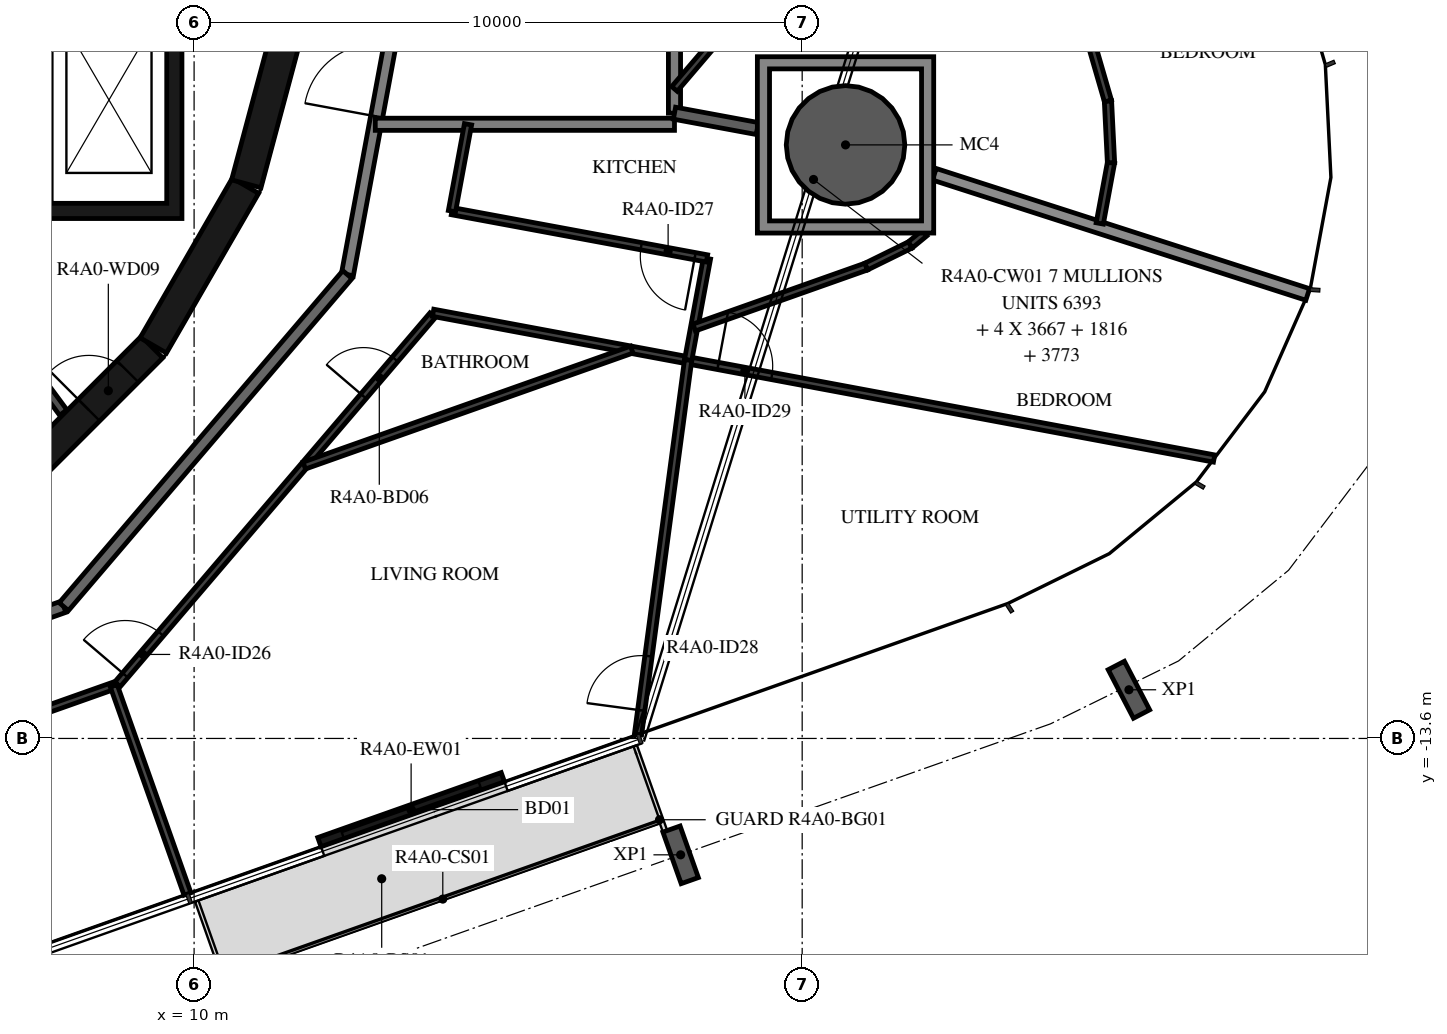
"""IFC4 building model, lengths in metres.
Left out: names, types, materials, properties, quantities, classifications, styles, units other than length and angle.
Written with IfcOpenShell. Run it as: python <this file> out.ifc"""

import sys

from ifc_helpers import new_model, si_unit, direction, frame, frame_2d, origin, origin_2d, place, context, subcontext, project, spatial, polyline, rectangle, hollow_circle, i_section, outline, extrude, element, fill, save


model = new_model("IFC4")
c1 = context("Model", 3, precision=1e-05, world=origin(), true_north=direction((0.0, 1.0)))
c2 = subcontext(c1, "Body", "Model", "MODEL_VIEW")
j1 = project(units=[si_unit("LENGTHUNIT", "METRE"), si_unit("PLANEANGLEUNIT", "RADIAN")], contexts=[c1])
p1 = place(None, origin())
s1 = spatial("IfcSite", under=j1, at=p1, CompositionType="ELEMENT")
p2 = place(p1, origin())
s2 = spatial("IfcBuilding", under=s1, at=p2, CompositionType="ELEMENT")
p3 = place(p2, frame((0.0, 0.0, 158.7)))
s3 = spatial("IfcBuildingStorey", under=s2, at=p3, CompositionType="ELEMENT", Elevation=158.7)
p4 = place(p3, frame((20.713, -3.839, -0.38), z_axis=(0.0, 0.0, 1.0), x_axis=(1.0, 0.0, 0.0)))
e1 = element("IfcColumn", 1, at=p4, inside=s3, PredefinedType="COLUMN", context=c2, shape_type="SweptSolid", body=[
    extrude(hollow_circle(Radius=0.975, WallThickness=0.045, at=origin_2d()), origin(), (0.0, 0.0, 1.0), 3.5),
])
for number, where, z_axis, x_axis in (
    (2, (18.001, -15.514, -0.38), (0.0, 0.0, 1.0), (-0.943, -0.334, 0.0)),
    (3, (25.374, -12.799, -0.38), (0.0, 0.0, 1.0), (-0.887, -0.461, 0.0)),
):
    element("IfcColumn", number, at=place(p3, frame(where, z_axis=z_axis, x_axis=x_axis)), inside=s3, PredefinedType="COLUMN", context=c2, shape_type="SweptSolid", body=[
        extrude(i_section(OverallWidth=0.3, OverallDepth=0.9, WebThickness=0.019, FlangeThickness=0.035, FilletRadius=0.03, at=origin_2d()), origin(), (0.0, 0.0, 1.0), 3.5),
    ])
p5 = place(p3, frame((12.061, -15.305, 0.0), z_axis=(0.0, 0.0, 1.0), x_axis=(0.942620722428, 0.333865502335, 0.0)))
e4 = element("IfcWall", 4, at=p5, inside=s3, PredefinedType="STANDARD", context=c2, shape_type="SweptSolid", body=[
    extrude(rectangle(XDim=3.2, YDim=0.16, at=frame_2d((1.6, 0.0))), origin(), (0.0, 0.0, 1.0), 3.12),
])
p6 = place(p5, frame((0.4, 0.0, 0.0)))
e5 = element("IfcOpeningElement", 5, at=p6, cuts=e4, PredefinedType="OPENING", context=c2, shape_type="SweptSolid", body=[
    extrude(rectangle(XDim=2.4, YDim=2.4, at=frame_2d((1.2, 1.2))), frame((0.0, 0.09, 0.0), z_axis=(0.0, -1.0, 0.0), x_axis=(1.0, 0.0, 0.0)), (0.0, 0.0, 1.0), 0.18),
])
p7 = place(p3, frame((7.164, -9.308, 0.0), z_axis=(0.0, 0.0, 1.0), x_axis=(0.707106781187, 0.707106781187, 0.0)))
e6 = element("IfcWall", 6, at=p7, inside=s3, PredefinedType="SHEAR", context=c2, shape_type="SweptSolid", body=[
    extrude(rectangle(XDim=3.032, YDim=0.5, at=frame_2d((1.516, 0.0))), origin(), (0.0, 0.0, 1.0), 3.12),
])
p8 = place(p7, frame((1.566, 0.0, 0.0)))
e7 = element("IfcOpeningElement", 7, at=p8, cuts=e6, PredefinedType="OPENING", context=c2, shape_type="SweptSolid", body=[
    extrude(rectangle(XDim=0.9, YDim=2.1, at=frame_2d((0.45, 1.05))), frame((0.0, 0.26, 0.0), z_axis=(0.0, -1.0, 0.0), x_axis=(1.0, 0.0, 0.0)), (0.0, 0.0, 1.0), 0.52),
])
for number, where, z_axis, x_axis in (
    (8, (9.329, -7.137, 0.0), (0.0, 0.0, 1.0), (0.5, 0.866, 0.0)),
    (9, (10.858, -4.479, 0.0), (0.0, 0.0, 1.0), (0.259, 0.966, 0.0)),
):
    element("IfcWall", number, at=place(p3, frame(where, z_axis=z_axis, x_axis=x_axis)), inside=s3, PredefinedType="SHEAR", context=c2, shape_type="SweptSolid", body=[
        extrude(rectangle(XDim=3.033, YDim=0.5, at=frame_2d((1.516, 0.0))), origin(), (0.0, 0.0, 1.0), 3.12),
    ])
p9 = place(p3, origin())
e10 = element("IfcWall", 10, at=p9, inside=s3, PredefinedType="SHEAR", context=c2, shape_type="SweptSolid", body=[
    extrude(outline(polyline([(9.8, -5.05), (9.8, -4.8), (9.8, -1.9), (9.55, -1.9), (9.55, -4.8), (7.65, -4.8), (7.65, -1.9), (7.4, -1.9), (7.4, -4.8), (5.5, -4.8), (5.5, -1.9), (5.25, -1.9), (5.25, -4.8), (3.35, -4.8), (3.35, -1.9), (3.1, -1.9), (3.1, -4.8), (1.2, -4.8), (1.2, -1.9), (0.95, -1.9), (0.95, -4.8), (-0.95, -4.8), (-0.95, -1.9), (-1.2, -1.9), (-1.2, -4.8), (-3.1, -4.8), (-3.1, -1.9), (-3.35, -1.9), (-3.35, -4.8), (-5.25, -4.8), (-5.25, -1.9), (-5.5, -1.9), (-5.5, -4.8), (-7.4, -4.8), (-7.4, -1.9), (-7.65, -1.9), (-7.65, -4.8), (-9.55, -4.8), (-9.55, -1.9), (-9.8, -1.9), (-9.8, -4.8), (-9.8, -5.05), (9.8, -5.05)])), origin(), (0.0, 0.0, 1.0), 3.12),
])
p10 = place(p3, frame((5.528, -5.098, 0.0), z_axis=(0.0, 0.0, 1.0), x_axis=(0.594034318069, -0.804439698769, 0.0)))
e11 = element("IfcWall", 11, at=p10, inside=s3, PredefinedType="PARTITIONING", context=c2, shape_type="SweptSolid", body=[
    extrude(rectangle(XDim=3.907, YDim=0.15, at=frame_2d((1.953, 0.0))), origin(), (0.0, 0.0, 1.0), 3.12),
])
p11 = place(p3, frame((12.521, -5.972, 0.0), z_axis=(0.0, 0.0, 1.0), x_axis=(0.182244189886, 0.983253301674, 0.0)))
e12 = element("IfcWall", 12, at=p11, inside=s3, PredefinedType="STANDARD", context=c2, shape_type="SweptSolid", body=[
    extrude(rectangle(XDim=4.176, YDim=0.2, at=frame_2d((2.088, 0.0))), origin(), (0.0, 0.0, 1.0), 3.12),
])
p12 = place(p11, frame((2.645, 0.0, 0.0)))
e13 = element("IfcOpeningElement", 13, at=p12, cuts=e12, PredefinedType="OPENING", context=c2, shape_type="SweptSolid", body=[
    extrude(rectangle(XDim=1.2, YDim=2.1, at=frame_2d((0.6, 1.05))), frame((0.0, 0.11, 0.0), z_axis=(0.0, -1.0, 0.0), x_axis=(1.0, 0.0, 0.0)), (0.0, 0.0, 1.0), 0.22),
])
p13 = place(p3, frame((1.088, -13.83, 0.0), z_axis=(0.0, 0.0, 1.0), x_axis=(0.942648397945, 0.333787354241, 0.0)))
e14 = element("IfcWall", 14, at=p13, inside=s3, PredefinedType="STANDARD", context=c2, shape_type="SweptSolid", body=[
    extrude(rectangle(XDim=7.181, YDim=0.2, at=frame_2d((3.591, 0.0))), origin(), (0.0, 0.0, 1.0), 3.12),
])
p14 = place(p13, frame((0.2, 0.0, 0.0)))
e15 = element("IfcOpeningElement", 15, at=p14, cuts=e14, PredefinedType="OPENING", context=c2, shape_type="SweptSolid", body=[
    extrude(rectangle(XDim=1.0, YDim=2.1, at=frame_2d((0.5, 1.05))), frame((0.0, 0.11, 0.0), z_axis=(0.0, -1.0, 0.0), x_axis=(1.0, 0.0, 0.0)), (0.0, 0.0, 1.0), 0.22),
])
p15 = place(p3, frame((7.858, -11.433, 0.0), z_axis=(0.0, 0.0, 1.0), x_axis=(0.649440801937, 0.760412154545, 0.0)))
e16 = element("IfcWall", 16, at=p15, inside=s3, PredefinedType="STANDARD", context=c2, shape_type="SweptSolid", body=[
    extrude(rectangle(XDim=7.181, YDim=0.2, at=frame_2d((3.59, 0.0))), origin(), (0.0, 0.0, 1.0), 3.12),
])
p16 = place(p3, frame((17.9, -3.318, 0.0), z_axis=(0.0, 0.0, 1.0), x_axis=(0.0, 1.0, 0.0)))
e17 = element("IfcWall", 17, at=p16, inside=s3, PredefinedType="STANDARD", context=c2, shape_type="SweptSolid", body=[
    extrude(rectangle(XDim=6.818, YDim=0.2, at=frame_2d((3.409, 0.0))), origin(), (0.0, 0.0, 1.0), 3.12),
])
p17 = place(p3, frame((12.979, -3.5, 0.0), z_axis=(0.0, 0.0, 1.0), x_axis=(1.0, 0.0, 0.0)))
e18 = element("IfcWall", 18, at=p17, inside=s3, PredefinedType="STANDARD", context=c2, shape_type="SweptSolid", body=[
    extrude(rectangle(XDim=4.92, YDim=0.2, at=frame_2d((2.46, 0.0))), origin(), (0.0, 0.0, 1.0), 3.12),
])
p18 = place(p3, frame((22.173, -4.322, 0.0), z_axis=(0.0, 0.0, 1.0), x_axis=(0.951906405572, -0.306388960362, 0.0)))
e19 = element("IfcWall", 19, at=p18, inside=s3, PredefinedType="STANDARD", context=c2, shape_type="SweptSolid", body=[
    extrude(rectangle(XDim=6.45, YDim=0.2, at=frame_2d((3.225, 0.0))), origin(), (0.0, 0.0, 1.0), 2.73),
])
p19 = place(p3, frame((17.9, -3.318, 0.0), z_axis=(0.0, 0.0, 1.0), x_axis=(0.983252800712, -0.182246892682, 0.0)))
e20 = element("IfcWall", 20, at=p19, inside=s3, PredefinedType="STANDARD", context=c2, shape_type="SweptSolid", body=[
    extrude(rectangle(XDim=1.386, YDim=0.2, at=frame_2d((0.693, 0.0))), origin(), (0.0, 0.0, 1.0), 3.12),
])
p20 = place(p3, frame((17.9, -2.918, 0.0), z_axis=(0.0, 0.0, 1.0), x_axis=(0.649469887983, 0.760387312232, 0.0)))
e21 = element("IfcWall", 21, at=p20, inside=s3, PredefinedType="PARTITIONING", context=c2, shape_type="SweptSolid", body=[
    extrude(rectangle(XDim=5.527, YDim=0.12, at=frame_2d((2.763, 0.0))), origin(), (0.0, 0.0, 1.0), 3.12),
])
p21 = place(p20, frame((1.7, 0.0, 0.0)))
e22 = element("IfcOpeningElement", 22, at=p21, cuts=e21, PredefinedType="OPENING", context=c2, shape_type="SweptSolid", body=[
    extrude(rectangle(XDim=0.9, YDim=2.1, at=frame_2d((0.45, 1.05))), frame((0.0, 0.07, 0.0), z_axis=(0.0, -1.0, 0.0), x_axis=(1.0, 0.0, 0.0)), (0.0, 0.0, 1.0), 0.14),
])
for number, where, z_axis, x_axis in (
    (23, (24.894, -5.131, 0.0), (0.0, 0.0, 1.0), (0.182, 0.983, 0.0)),
    (24, (25.079, -4.132, 0.0), (0.0, 0.0, 1.0), (-0.049, 0.999, 0.0)),
):
    element("IfcWall", number, at=place(p3, frame(where, z_axis=z_axis, x_axis=x_axis)), inside=s3, PredefinedType="PARTITIONING", context=c2, shape_type="SweptSolid", body=[
        extrude(rectangle(XDim=1.016, YDim=0.12, at=frame_2d((0.508, 0.0))), origin(), (0.0, 0.0, 1.0), 3.12),
    ])
p22 = place(p3, frame((25.029, -3.117, 0.0), z_axis=(0.0, 0.0, 1.0), x_axis=(-0.278559922069, 0.96041885124, 0.0)))
e25 = element("IfcWall", 25, at=p22, inside=s3, PredefinedType="PARTITIONING", context=c2, shape_type="SweptSolid", body=[
    extrude(rectangle(XDim=1.016, YDim=0.12, at=frame_2d((0.508, 0.0))), origin(), (0.0, 0.0, 1.0), 3.12),
])
p23 = place(p3, frame((1.269, -15.357, 0.0), z_axis=(0.0, 0.0, 1.0), x_axis=(0.942639442898, 0.333812643101, 0.0)))
e26 = element("IfcWall", 26, at=p23, inside=s3, PredefinedType="PARTITIONING", context=c2, shape_type="SweptSolid", body=[
    extrude(rectangle(XDim=7.86, YDim=0.12, at=frame_2d((3.93, 0.0))), origin(), (0.0, 0.0, 1.0), 3.12),
])
p24 = place(p23, frame((0.2, 0.0, 0.0)))
e27 = element("IfcOpeningElement", 27, at=p24, cuts=e26, PredefinedType="OPENING", context=c2, shape_type="SweptSolid", body=[
    extrude(rectangle(XDim=0.9, YDim=2.1, at=frame_2d((0.45, 1.05))), frame((0.0, 0.07, 0.0), z_axis=(0.0, -1.0, 0.0), x_axis=(1.0, 0.0, 0.0)), (0.0, 0.0, 1.0), 0.14),
])
p25 = place(p3, frame((8.737, -12.713, 0.0), z_axis=(0.0, 0.0, 1.0), x_axis=(0.649430604754, 0.760420863476, 0.0)))
e28 = element("IfcWall", 28, at=p25, inside=s3, PredefinedType="PARTITIONING", context=c2, shape_type="SweptSolid", body=[
    extrude(rectangle(XDim=7.985, YDim=0.12, at=frame_2d((3.992, 0.0))), origin(), (0.0, 0.0, 1.0), 3.12),
])
p26 = place(p25, frame((0.2, 0.0, 0.0)))
e29 = element("IfcOpeningElement", 29, at=p26, cuts=e28, PredefinedType="OPENING", context=c2, shape_type="SweptSolid", body=[
    extrude(rectangle(XDim=0.9, YDim=2.1, at=frame_2d((0.45, 1.05))), frame((0.0, 0.07, 0.0), z_axis=(0.0, -1.0, 0.0), x_axis=(1.0, 0.0, 0.0)), (0.0, 0.0, 1.0), 0.14),
])
p27 = place(p25, frame((6.234, 0.0, 0.0)))
e30 = element("IfcOpeningElement", 30, at=p27, cuts=e28, PredefinedType="OPENING", context=c2, shape_type="SweptSolid", body=[
    extrude(rectangle(XDim=0.8, YDim=2.1, at=frame_2d((0.4, 1.05))), frame((0.0, 0.07, 0.0), z_axis=(0.0, -1.0, 0.0), x_axis=(1.0, 0.0, 0.0)), (0.0, 0.0, 1.0), 0.14),
])
p28 = place(p3, frame((13.93, -6.6, 0.0), z_axis=(0.0, 0.0, 1.0), x_axis=(0.983034896283, -0.183418626887, 0.0)))
e31 = element("IfcWall", 31, at=p28, inside=s3, PredefinedType="PARTITIONING", context=c2, shape_type="SweptSolid", body=[
    extrude(rectangle(XDim=13.066, YDim=0.12, at=frame_2d((6.533, 0.0))), origin(), (0.0, 0.0, 1.0), 3.12),
])
p29 = place(p28, frame((4.766, 0.0, 0.0)))
e32 = element("IfcOpeningElement", 32, at=p29, cuts=e31, PredefinedType="OPENING", context=c2, shape_type="SweptSolid", body=[
    extrude(rectangle(XDim=0.9, YDim=2.1, at=frame_2d((0.45, 1.05))), frame((0.0, 0.07, 0.0), z_axis=(0.0, -1.0, 0.0), x_axis=(1.0, 0.0, 0.0)), (0.0, 0.0, 1.0), 0.14),
])
p30 = place(p3, frame((18.125, -7.377, 0.0), z_axis=(0.0, 0.0, 1.0), x_axis=(0.182233242958, 0.983255330604, 0.0)))
e33 = element("IfcWall", 33, at=p30, inside=s3, PredefinedType="PARTITIONING", context=c2, shape_type="SweptSolid", body=[
    extrude(rectangle(XDim=1.7, YDim=0.12, at=frame_2d((0.85, 0.0))), origin(), (0.0, 0.0, 1.0), 3.12),
])
p31 = place(p3, frame((18.435, -5.706, 0.0), z_axis=(0.0, 0.0, 1.0), x_axis=(-0.983256187302, 0.18222862051, 0.0)))
e34 = element("IfcWall", 34, at=p31, inside=s3, PredefinedType="PARTITIONING", context=c2, shape_type="SweptSolid", body=[
    extrude(rectangle(XDim=4.266, YDim=0.12, at=frame_2d((2.133, 0.0))), origin(), (0.0, 0.0, 1.0), 3.12),
])
p32 = place(p31, frame((0.2, 0.0, 0.0)))
e35 = element("IfcOpeningElement", 35, at=p32, cuts=e34, PredefinedType="OPENING", context=c2, shape_type="SweptSolid", body=[
    extrude(rectangle(XDim=0.9, YDim=2.1, at=frame_2d((0.45, 1.05))), frame((0.0, 0.07, 0.0), z_axis=(0.0, -1.0, 0.0), x_axis=(1.0, 0.0, 0.0)), (0.0, 0.0, 1.0), 0.14),
])
p33 = place(p3, frame((14.24, -4.928, 0.0), z_axis=(0.0, 0.0, 1.0), x_axis=(0.182329957282, 0.983237400976, 0.0)))
e36 = element("IfcWall", 36, at=p33, inside=s3, PredefinedType="PARTITIONING", context=c2, shape_type="SweptSolid", body=[
    extrude(rectangle(XDim=1.453, YDim=0.12, at=frame_2d((0.727, 0.0))), origin(), (0.0, 0.0, 1.0), 3.12),
])
p34 = place(p3, frame((9.891, -16.158, 0.0), z_axis=(0.0, 0.0, 1.0), x_axis=(-0.33385336213, 0.942625022262, 0.0)))
e37 = element("IfcWall", 37, at=p34, inside=s3, PredefinedType="PARTITIONING", context=c2, shape_type="SweptSolid", body=[
    extrude(rectangle(XDim=3.633, YDim=0.12, at=frame_2d((1.816, 0.0))), origin(), (0.0, 0.0, 1.0), 2.73),
])
p35 = place(p3, frame((17.198, -7.206, 0.0), z_axis=(0.0, 0.0, 1.0), x_axis=(-0.942639551003, -0.333812337826, 0.0)))
e38 = element("IfcWall", 38, at=p35, inside=s3, PredefinedType="PARTITIONING", context=c2, shape_type="SweptSolid", body=[
    extrude(rectangle(XDim=5.713, YDim=0.12, at=frame_2d((2.857, 0.0))), origin(), (0.0, 0.0, 1.0), 3.12),
])
p36 = place(p3, frame((17.3, -13.534, 0.0), z_axis=(0.0, 0.0, 1.0), x_axis=(0.132727504799, 0.991152566192, 0.0)))
e39 = element("IfcWall", 39, at=p36, inside=s3, PredefinedType="PARTITIONING", context=c2, shape_type="SweptSolid", body=[
    extrude(rectangle(XDim=6.212, YDim=0.12, at=frame_2d((3.106, 0.0))), origin(), (0.0, 0.0, 1.0), 3.12),
])
p37 = place(p36, frame((0.4, 0.0, 0.0)))
e40 = element("IfcOpeningElement", 40, at=p37, cuts=e39, PredefinedType="OPENING", context=c2, shape_type="SweptSolid", body=[
    extrude(rectangle(XDim=0.9, YDim=2.1, at=frame_2d((0.45, 1.05))), frame((0.0, 0.07, 0.0), z_axis=(0.0, -1.0, 0.0), x_axis=(1.0, 0.0, 0.0)), (0.0, 0.0, 1.0), 0.14),
])
p38 = place(p3, frame((22.013, -5.289, 0.0), z_axis=(0.0, 0.0, 1.0), x_axis=(-0.771907381926, -0.635735002755, 0.0)))
e41 = element("IfcWall", 41, at=p38, inside=s3, PredefinedType="PARTITIONING", context=c2, shape_type="SweptSolid", body=[
    extrude(rectangle(XDim=0.308, YDim=0.12, at=frame_2d((0.154, 0.0))), origin(), (0.0, 0.0, 1.0), 3.12),
])
p39 = place(p3, frame((21.775, -5.485, 0.0), z_axis=(0.0, 0.0, 1.0), x_axis=(-0.897493373385, -0.441027940986, 0.0)))
e42 = element("IfcWall", 42, at=p39, inside=s3, PredefinedType="PARTITIONING", context=c2, shape_type="SweptSolid", body=[
    extrude(rectangle(XDim=0.807, YDim=0.12, at=frame_2d((0.403, 0.0))), origin(), (0.0, 0.0, 1.0), 3.12),
])
p40 = place(p3, frame((21.052, -5.841, 0.0), z_axis=(0.0, 0.0, 1.0), x_axis=(-0.94262615799, -0.33385015542, 0.0)))
e43 = element("IfcWall", 43, at=p40, inside=s3, PredefinedType="PARTITIONING", context=c2, shape_type="SweptSolid", body=[
    extrude(rectangle(XDim=3.0, YDim=0.12, at=frame_2d((1.5, 0.0))), origin(), (0.0, 0.0, 1.0), 3.12),
])
p41 = place(p3, origin())
e44 = element("IfcWall", 44, at=p41, inside=s3, PredefinedType="STANDARD", context=c2, shape_type="SweptSolid", body=[
    extrude(outline(polyline([(22.163, -2.389), (22.163, -5.289), (19.263, -5.289), (19.263, -2.389), (22.163, -2.389)]), holes=[polyline([(19.463, -5.089), (21.963, -5.089), (21.963, -2.589), (19.463, -2.589), (19.463, -5.089)])]), origin(), (0.0, 0.0, 1.0), 3.12),
])
p42 = place(p6, origin())
e45 = element("IfcDoor", 45, at=p42, inside=s3, OperationType="DOUBLE_DOOR_SLIDING", PredefinedType="DOOR", context=c2, shape_type="SweptSolid", body=[
    extrude(rectangle(XDim=2.4, YDim=2.4, at=frame_2d((1.2, 1.2))), frame((0.0, 0.025, 0.0), z_axis=(0.0, -1.0, 0.0), x_axis=(1.0, 0.0, 0.0)), (0.0, 0.0, 1.0), 0.05),
])
fill(e5, e45)
p43 = place(p8, origin())
e46 = element("IfcDoor", 46, at=p43, inside=s3, OperationType="SINGLE_SWING_LEFT", PredefinedType="DOOR", context=c2, shape_type="SweptSolid", body=[
    extrude(rectangle(XDim=0.9, YDim=2.1, at=frame_2d((0.45, 1.05))), frame((0.0, 0.025, 0.0), z_axis=(0.0, -1.0, 0.0), x_axis=(1.0, 0.0, 0.0)), (0.0, 0.0, 1.0), 0.05),
])
fill(e7, e46)
p44 = place(p26, origin())
e47 = element("IfcDoor", 47, at=p44, inside=s3, OperationType="SINGLE_SWING_RIGHT", PredefinedType="DOOR", context=c2, shape_type="SweptSolid", body=[
    extrude(rectangle(XDim=0.9, YDim=2.1, at=frame_2d((0.45, 1.05))), frame((0.0, 0.025, 0.0), z_axis=(0.0, -1.0, 0.0), x_axis=(1.0, 0.0, 0.0)), (0.0, 0.0, 1.0), 0.05),
])
fill(e29, e47)
p45 = place(p27, origin())
e48 = element("IfcDoor", 48, at=p45, inside=s3, OperationType="SINGLE_SWING_RIGHT", PredefinedType="DOOR", context=c2, shape_type="SweptSolid", body=[
    extrude(rectangle(XDim=0.8, YDim=2.1, at=frame_2d((0.4, 1.05))), frame((0.0, 0.025, 0.0), z_axis=(0.0, -1.0, 0.0), x_axis=(1.0, 0.0, 0.0)), (0.0, 0.0, 1.0), 0.05),
])
fill(e30, e48)
p46 = place(p32, origin())
e49 = element("IfcDoor", 49, at=p46, inside=s3, OperationType="SINGLE_SWING_LEFT", PredefinedType="DOOR", context=c2, shape_type="SweptSolid", body=[
    extrude(rectangle(XDim=0.9, YDim=2.1, at=frame_2d((0.45, 1.05))), frame((0.0, 0.025, 0.0), z_axis=(0.0, -1.0, 0.0), x_axis=(1.0, 0.0, 0.0)), (0.0, 0.0, 1.0), 0.05),
])
fill(e35, e49)
p47 = place(p37, origin())
e50 = element("IfcDoor", 50, at=p47, inside=s3, OperationType="SINGLE_SWING_RIGHT", PredefinedType="DOOR", context=c2, shape_type="SweptSolid", body=[
    extrude(rectangle(XDim=0.9, YDim=2.1, at=frame_2d((0.45, 1.05))), frame((0.0, 0.025, 0.0), z_axis=(0.0, -1.0, 0.0), x_axis=(1.0, 0.0, 0.0)), (0.0, 0.0, 1.0), 0.05),
])
fill(e40, e50)
p48 = place(p29, origin())
e51 = element("IfcDoor", 51, at=p48, inside=s3, OperationType="SINGLE_SWING_RIGHT", PredefinedType="DOOR", context=c2, shape_type="SweptSolid", body=[
    extrude(rectangle(XDim=0.9, YDim=2.1, at=frame_2d((0.45, 1.05))), frame((0.0, 0.025, 0.0), z_axis=(0.0, -1.0, 0.0), x_axis=(1.0, 0.0, 0.0)), (0.0, 0.0, 1.0), 0.05),
])
fill(e32, e51)
p49 = place(p12, origin())
e52 = element("IfcDoor", 52, at=p49, inside=s3, OperationType="DOUBLE_DOOR_SINGLE_SWING", PredefinedType="DOOR", context=c2, shape_type="SweptSolid", body=[
    extrude(rectangle(XDim=1.2, YDim=2.1, at=frame_2d((0.6, 1.05))), frame((0.0, 0.025, 0.0), z_axis=(0.0, -1.0, 0.0), x_axis=(1.0, 0.0, 0.0)), (0.0, 0.0, 1.0), 0.05),
])
fill(e13, e52)
save(model, sys.argv[1])
